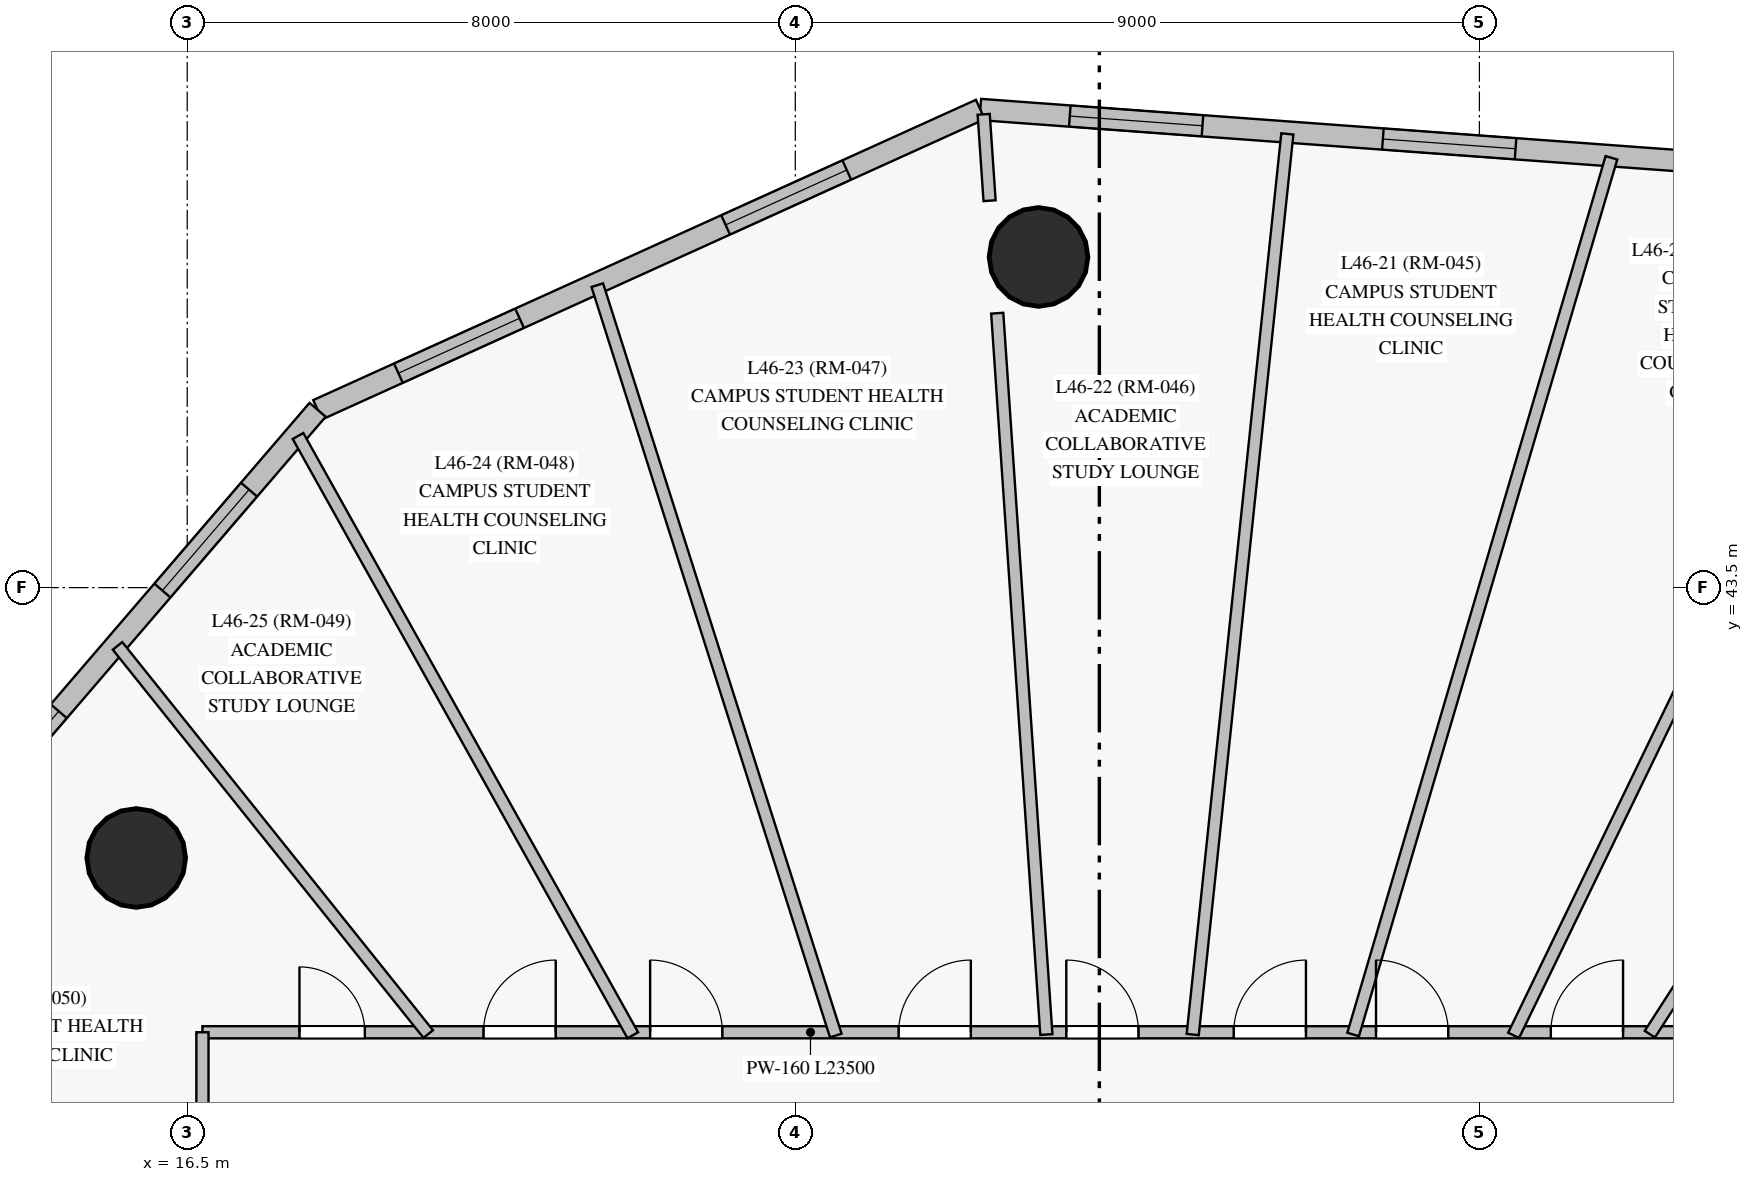
"""IFC4 building model, lengths in metres.
Left out: names, types, materials, properties, quantities, classifications, styles, units other than length and angle.
Written with IfcOpenShell. Run it as: python <this file> out.ifc"""

import sys

from ifc_helpers import new_model, si_unit, direction, frame, frame_2d, origin, origin_with_axes, origin_2d, place, context, subcontext, project, spatial, rectangle, circle, extrude, source, transform, mapped, element, fill, save


model = new_model("IFC4")
c1 = context("Model", 3, precision=1e-05, world=origin(), true_north=direction((0.0, 1.0)))
c2 = subcontext(c1, "Body", "Model", "MODEL_VIEW")
j1 = project(units=[si_unit("LENGTHUNIT", "METRE"), si_unit("PLANEANGLEUNIT", "RADIAN")], contexts=[c1])
p1 = place(None, origin())
s1 = spatial("IfcSite", under=j1, at=p1, CompositionType="ELEMENT")
p2 = place(p1, origin())
s2 = spatial("IfcBuilding", under=s1, at=p2, CompositionType="ELEMENT")
p3 = place(p2, frame((0.0, 0.0, 162.65)))
s3 = spatial("IfcBuildingStorey", under=s2, at=p3, CompositionType="ELEMENT", Elevation=162.65)
m1 = source(origin_with_axes(), c2, "Body", "SweptSolid", [
    extrude(circle(Radius=0.65, at=origin_2d()), origin(), (0.0, 0.0, 1.0), 3.05),
])
for number, where, z_axis, x_axis in (
    (1, (27.7, 47.85, 0.0), (0.0, 0.0, 1.0), (1.0, 0.0, 0.0)),
    (2, (15.829, 39.943, 0.0), (0.0, 0.0, 1.0), (1.0, 0.0, 0.0)),
):
    element("IfcColumn", number, at=place(p3, frame(where, z_axis=z_axis, x_axis=x_axis)), inside=s3, PredefinedType="COLUMN", context=c2, shape_type="MappedRepresentation", body=[
        mapped(m1, transform((0.0, 0.0, 0.0), scale=1.0)),
    ])
p4 = place(p3, frame((38.955, 48.908, 0.0), z_axis=(0.0, 0.0, 1.0), x_axis=(-0.997320223423, 0.07315990672, 0.0)))
e3 = element("IfcWall", 3, at=p4, inside=s3, PredefinedType="SOLIDWALL", context=c2, shape_type="SweptSolid", body=[
    extrude(rectangle(XDim=12.053, YDim=0.28, at=frame_2d((6.027, 0.0))), origin(), (0.0, 0.0, 1.0), 2.825),
])
p5 = place(p4, frame((1.022, 0.0, 0.85)))
e4 = element("IfcOpeningElement", 4, at=p5, cuts=e3, PredefinedType="OPENING", context=c2, shape_type="SweptSolid", body=[
    extrude(rectangle(XDim=1.75, YDim=1.65, at=frame_2d((0.875, 0.825))), frame((0.0, 0.15, 0.0), z_axis=(0.0, -1.0, 0.0), x_axis=(1.0, 0.0, 0.0)), (0.0, 0.0, 1.0), 0.3),
])
p6 = place(p4, frame((4.993, 0.0, 0.85)))
e5 = element("IfcOpeningElement", 5, at=p6, cuts=e3, PredefinedType="OPENING", context=c2, shape_type="SweptSolid", body=[
    extrude(rectangle(XDim=1.75, YDim=1.65, at=frame_2d((0.875, 0.825))), frame((0.0, 0.15, 0.0), z_axis=(0.0, -1.0, 0.0), x_axis=(1.0, 0.0, 0.0)), (0.0, 0.0, 1.0), 0.3),
])
p7 = place(p4, frame((9.123, 0.0, 0.85)))
e6 = element("IfcOpeningElement", 6, at=p7, cuts=e3, PredefinedType="OPENING", context=c2, shape_type="SweptSolid", body=[
    extrude(rectangle(XDim=1.75, YDim=1.65, at=frame_2d((0.875, 0.825))), frame((0.0, 0.15, 0.0), z_axis=(0.0, -1.0, 0.0), x_axis=(1.0, 0.0, 0.0)), (0.0, 0.0, 1.0), 0.3),
])
p8 = place(p3, frame((26.934, 49.79, 0.0), z_axis=(0.0, 0.0, 1.0), x_axis=(-0.910843657425, -0.412751537525, 0.0)))
e7 = element("IfcWall", 7, at=p8, inside=s3, PredefinedType="SOLIDWALL", context=c2, shape_type="SweptSolid", body=[
    extrude(rectangle(XDim=9.572, YDim=0.28, at=frame_2d((4.786, 0.0))), origin(), (0.0, 0.0, 1.0), 2.825),
])
p9 = place(p8, frame((1.929, 0.0, 0.85)))
e8 = element("IfcOpeningElement", 8, at=p9, cuts=e7, PredefinedType="OPENING", context=c2, shape_type="SweptSolid", body=[
    extrude(rectangle(XDim=1.75, YDim=1.65, at=frame_2d((0.875, 0.825))), frame((0.0, 0.15, 0.0), z_axis=(0.0, -1.0, 0.0), x_axis=(1.0, 0.0, 0.0)), (0.0, 0.0, 1.0), 0.3),
])
p10 = place(p8, frame((6.655, 0.0, 0.85)))
e9 = element("IfcOpeningElement", 9, at=p10, cuts=e7, PredefinedType="OPENING", context=c2, shape_type="SweptSolid", body=[
    extrude(rectangle(XDim=1.75, YDim=1.65, at=frame_2d((0.875, 0.825))), frame((0.0, 0.15, 0.0), z_axis=(0.0, -1.0, 0.0), x_axis=(1.0, 0.0, 0.0)), (0.0, 0.0, 1.0), 0.3),
])
p11 = place(p3, frame((18.215, 45.839, 0.0), z_axis=(0.0, 0.0, 1.0), x_axis=(-0.651462515178, -0.758680823085, 0.0)))
e10 = element("IfcWall", 10, at=p11, inside=s3, PredefinedType="SOLIDWALL", context=c2, shape_type="SweptSolid", body=[
    extrude(rectangle(XDim=13.656, YDim=0.28, at=frame_2d((6.828, 0.0))), origin(), (0.0, 0.0, 1.0), 2.825),
])
p12 = place(p11, frame((1.385, 0.0, 0.85)))
e11 = element("IfcOpeningElement", 11, at=p12, cuts=e10, PredefinedType="OPENING", context=c2, shape_type="SweptSolid", body=[
    extrude(rectangle(XDim=1.75, YDim=1.65, at=frame_2d((0.875, 0.825))), frame((0.0, 0.15, 0.0), z_axis=(0.0, -1.0, 0.0), x_axis=(1.0, 0.0, 0.0)), (0.0, 0.0, 1.0), 0.3),
])
p13 = place(p11, frame((5.227, 0.0, 0.85)))
e12 = element("IfcOpeningElement", 12, at=p13, cuts=e10, PredefinedType="OPENING", context=c2, shape_type="SweptSolid", body=[
    extrude(rectangle(XDim=1.75, YDim=1.65, at=frame_2d((0.875, 0.825))), frame((0.0, 0.15, 0.0), z_axis=(0.0, -1.0, 0.0), x_axis=(1.0, 0.0, 0.0)), (0.0, 0.0, 1.0), 0.3),
])
p14 = place(p11, frame((8.636, 0.0, 0.85)))
e13 = element("IfcOpeningElement", 13, at=p14, cuts=e10, PredefinedType="OPENING", context=c2, shape_type="SweptSolid", body=[
    extrude(rectangle(XDim=1.75, YDim=1.65, at=frame_2d((0.875, 0.825))), frame((0.0, 0.15, 0.0), z_axis=(0.0, -1.0, 0.0), x_axis=(1.0, 0.0, 0.0)), (0.0, 0.0, 1.0), 0.3),
])
p15 = place(p11, frame((12.091, 0.0, 0.85)))
e14 = element("IfcOpeningElement", 14, at=p15, cuts=e10, PredefinedType="OPENING", context=c2, shape_type="SweptSolid", body=[
    extrude(rectangle(XDim=0.95, YDim=1.5, at=frame_2d((0.475, 0.75))), frame((0.0, 0.15, 0.0), z_axis=(0.0, -1.0, 0.0), x_axis=(1.0, 0.0, 0.0)), (0.0, 0.0, 1.0), 0.3),
])
p16 = place(p3, frame((16.7, 37.65, 0.0), z_axis=(0.0, 0.0, 1.0), x_axis=(1.0, 0.0, 0.0)))
e15 = element("IfcWall", 15, at=p16, inside=s3, PredefinedType="PARTITIONING", context=c2, shape_type="SweptSolid", body=[
    extrude(rectangle(XDim=23.5, YDim=0.16, at=frame_2d((11.75, 0.0))), origin(), (0.0, 0.0, 1.0), 2.375),
])
p17 = place(p16, frame((20.87, 0.0, 0.0)))
e16 = element("IfcOpeningElement", 16, at=p17, cuts=e15, PredefinedType="OPENING", context=c2, shape_type="SweptSolid", body=[
    extrude(rectangle(XDim=0.95, YDim=2.15, at=frame_2d((0.475, 1.075))), frame((0.0, 0.09, 0.0), z_axis=(0.0, -1.0, 0.0), x_axis=(1.0, 0.0, 0.0)), (0.0, 0.0, 1.0), 0.18),
])
p18 = place(p16, frame((17.74, 0.0, 0.0)))
e17 = element("IfcOpeningElement", 17, at=p18, cuts=e15, PredefinedType="OPENING", context=c2, shape_type="SweptSolid", body=[
    extrude(rectangle(XDim=0.95, YDim=2.15, at=frame_2d((0.475, 1.075))), frame((0.0, 0.09, 0.0), z_axis=(0.0, -1.0, 0.0), x_axis=(1.0, 0.0, 0.0)), (0.0, 0.0, 1.0), 0.18),
])
p19 = place(p16, frame((15.44, 0.0, 0.0)))
e18 = element("IfcOpeningElement", 18, at=p19, cuts=e15, PredefinedType="OPENING", context=c2, shape_type="SweptSolid", body=[
    extrude(rectangle(XDim=0.95, YDim=2.15, at=frame_2d((0.475, 1.075))), frame((0.0, 0.09, 0.0), z_axis=(0.0, -1.0, 0.0), x_axis=(1.0, 0.0, 0.0)), (0.0, 0.0, 1.0), 0.18),
])
p20 = place(p16, frame((13.568, 0.0, 0.0)))
e19 = element("IfcOpeningElement", 19, at=p20, cuts=e15, PredefinedType="OPENING", context=c2, shape_type="SweptSolid", body=[
    extrude(rectangle(XDim=0.95, YDim=2.15, at=frame_2d((0.475, 1.075))), frame((0.0, 0.09, 0.0), z_axis=(0.0, -1.0, 0.0), x_axis=(1.0, 0.0, 0.0)), (0.0, 0.0, 1.0), 0.18),
])
p21 = place(p16, frame((11.365, 0.0, 0.0)))
e20 = element("IfcOpeningElement", 20, at=p21, cuts=e15, PredefinedType="OPENING", context=c2, shape_type="SweptSolid", body=[
    extrude(rectangle(XDim=0.95, YDim=2.15, at=frame_2d((0.475, 1.075))), frame((0.0, 0.09, 0.0), z_axis=(0.0, -1.0, 0.0), x_axis=(1.0, 0.0, 0.0)), (0.0, 0.0, 1.0), 0.18),
])
p22 = place(p16, frame((9.159, 0.0, 0.0)))
e21 = element("IfcOpeningElement", 21, at=p22, cuts=e15, PredefinedType="OPENING", context=c2, shape_type="SweptSolid", body=[
    extrude(rectangle(XDim=0.95, YDim=2.15, at=frame_2d((0.475, 1.075))), frame((0.0, 0.09, 0.0), z_axis=(0.0, -1.0, 0.0), x_axis=(1.0, 0.0, 0.0)), (0.0, 0.0, 1.0), 0.18),
])
p23 = place(p16, frame((5.89, 0.0, 0.0)))
e22 = element("IfcOpeningElement", 22, at=p23, cuts=e15, PredefinedType="OPENING", context=c2, shape_type="SweptSolid", body=[
    extrude(rectangle(XDim=0.95, YDim=2.15, at=frame_2d((0.475, 1.075))), frame((0.0, 0.09, 0.0), z_axis=(0.0, -1.0, 0.0), x_axis=(1.0, 0.0, 0.0)), (0.0, 0.0, 1.0), 0.18),
])
p24 = place(p16, frame((3.698, 0.0, 0.0)))
e23 = element("IfcOpeningElement", 23, at=p24, cuts=e15, PredefinedType="OPENING", context=c2, shape_type="SweptSolid", body=[
    extrude(rectangle(XDim=0.95, YDim=2.15, at=frame_2d((0.475, 1.075))), frame((0.0, 0.09, 0.0), z_axis=(0.0, -1.0, 0.0), x_axis=(1.0, 0.0, 0.0)), (0.0, 0.0, 1.0), 0.18),
])
p25 = place(p16, frame((1.277, 0.0, 0.0)))
e24 = element("IfcOpeningElement", 24, at=p25, cuts=e15, PredefinedType="OPENING", context=c2, shape_type="SweptSolid", body=[
    extrude(rectangle(XDim=0.86, YDim=2.04, at=frame_2d((0.43, 1.02))), frame((0.0, 0.09, 0.0), z_axis=(0.0, -1.0, 0.0), x_axis=(1.0, 0.0, 0.0)), (0.0, 0.0, 1.0), 0.18),
])
p26 = place(p3, frame((16.7, 15.35, 0.0), z_axis=(0.0, 0.0, 1.0), x_axis=(0.0, 1.0, 0.0)))
e25 = element("IfcWall", 25, at=p26, inside=s3, PredefinedType="PARTITIONING", context=c2, shape_type="SweptSolid", body=[
    extrude(rectangle(XDim=22.3, YDim=0.16, at=frame_2d((11.15, 0.0))), origin(), (0.0, 0.0, 1.0), 2.275),
])
p27 = place(p26, frame((11.715, 0.0, 0.0)))
e26 = element("IfcOpeningElement", 26, at=p27, cuts=e25, PredefinedType="OPENING", context=c2, shape_type="SweptSolid", body=[
    extrude(rectangle(XDim=0.95, YDim=2.15, at=frame_2d((0.475, 1.075))), frame((0.0, 0.09, 0.0), z_axis=(0.0, -1.0, 0.0), x_axis=(1.0, 0.0, 0.0)), (0.0, 0.0, 1.0), 0.18),
])
p28 = place(p26, frame((7.33, 0.0, 0.0)))
e27 = element("IfcOpeningElement", 27, at=p28, cuts=e25, PredefinedType="OPENING", context=c2, shape_type="SweptSolid", body=[
    extrude(rectangle(XDim=0.96, YDim=2.15, at=frame_2d((0.48, 1.075))), frame((0.0, 0.09, 0.0), z_axis=(0.0, -1.0, 0.0), x_axis=(1.0, 0.0, 0.0)), (0.0, 0.0, 1.0), 0.18),
])
p29 = place(p26, frame((4.61, 0.0, 0.0)))
e28 = element("IfcOpeningElement", 28, at=p29, cuts=e25, PredefinedType="OPENING", context=c2, shape_type="SweptSolid", body=[
    extrude(rectangle(XDim=0.95, YDim=2.15, at=frame_2d((0.475, 1.075))), frame((0.0, 0.09, 0.0), z_axis=(0.0, -1.0, 0.0), x_axis=(1.0, 0.0, 0.0)), (0.0, 0.0, 1.0), 0.18),
])
p30 = place(p26, frame((16.99, 0.0, 0.0)))
e29 = element("IfcOpeningElement", 29, at=p30, cuts=e25, PredefinedType="OPENING", context=c2, shape_type="SweptSolid", body=[
    extrude(rectangle(XDim=0.95, YDim=2.15, at=frame_2d((0.475, 1.075))), frame((0.0, 0.09, 0.0), z_axis=(0.0, -1.0, 0.0), x_axis=(1.0, 0.0, 0.0)), (0.0, 0.0, 1.0), 0.18),
])
p31 = place(p26, frame((14.56, 0.0, 0.0)))
e30 = element("IfcOpeningElement", 30, at=p31, cuts=e25, PredefinedType="OPENING", context=c2, shape_type="SweptSolid", body=[
    extrude(rectangle(XDim=0.95, YDim=2.15, at=frame_2d((0.475, 1.075))), frame((0.0, 0.09, 0.0), z_axis=(0.0, -1.0, 0.0), x_axis=(1.0, 0.0, 0.0)), (0.0, 0.0, 1.0), 0.18),
])
p32 = place(p26, frame((13.43, 0.0, 0.0)))
e31 = element("IfcOpeningElement", 31, at=p32, cuts=e25, PredefinedType="OPENING", context=c2, shape_type="SweptSolid", body=[
    extrude(rectangle(XDim=0.95, YDim=2.15, at=frame_2d((0.475, 1.075))), frame((0.0, 0.09, 0.0), z_axis=(0.0, -1.0, 0.0), x_axis=(1.0, 0.0, 0.0)), (0.0, 0.0, 1.0), 0.18),
])
p33 = place(p3, frame((33.95, 37.61, 0.0), z_axis=(0.0, 0.0, 1.0), x_axis=(0.436077675218, 0.899909029389, 0.0)))
e32 = element("IfcWall", 32, at=p33, inside=s3, PredefinedType="PARTITIONING", context=c2, shape_type="SweptSolid", body=[
    extrude(rectangle(XDim=12.175, YDim=0.16, at=frame_2d((6.087, 0.0))), origin(), (0.0, 0.0, 1.0), 2.825),
])
p34 = place(p3, frame((31.839, 37.621, 0.0), z_axis=(0.0, 0.0, 1.0), x_axis=(0.282612627523, 0.959234123019, 0.0)))
e33 = element("IfcWall", 33, at=p34, inside=s3, PredefinedType="PARTITIONING", context=c2, shape_type="SweptSolid", body=[
    extrude(rectangle(XDim=12.023, YDim=0.16, at=frame_2d((6.012, 0.0))), origin(), (0.0, 0.0, 1.0), 2.825),
])
p35 = place(p3, frame((29.729, 37.62, 0.0), z_axis=(0.0, 0.0, 1.0), x_axis=(0.104491703071, 0.994525758334, 0.0)))
e34 = element("IfcWall", 34, at=p35, inside=s3, PredefinedType="PARTITIONING", context=c2, shape_type="SweptSolid", body=[
    extrude(rectangle(XDim=11.914, YDim=0.16, at=frame_2d((5.957, 0.0))), origin(), (0.0, 0.0, 1.0), 2.825),
])
p36 = place(p3, frame((35.742, 37.625, 0.0), z_axis=(0.0, 0.0, 1.0), x_axis=(0.541788474869, 0.840514871076, 0.0)))
e35 = element("IfcWall", 35, at=p36, inside=s3, PredefinedType="PARTITIONING", context=c2, shape_type="SweptSolid", body=[
    extrude(rectangle(XDim=10.469, YDim=0.16, at=frame_2d((5.235, 0.0))), origin(), (0.0, 0.0, 1.0), 2.825),
])
p37 = place(p3, frame((25.033, 37.607, 0.0), z_axis=(0.0, 0.0, 1.0), x_axis=(-0.302917623472, 0.953016743499, 0.0)))
e36 = element("IfcWall", 36, at=p37, inside=s3, PredefinedType="PARTITIONING", context=c2, shape_type="SweptSolid", body=[
    extrude(rectangle(XDim=10.358, YDim=0.16, at=frame_2d((5.179, 0.0))), origin(), (0.0, 0.0, 1.0), 2.825),
])
p38 = place(p3, frame((27.803, 37.62, 0.0), z_axis=(0.0, 0.0, 1.0), x_axis=(-0.067965244052, 0.99768768941, 0.0)))
e37 = element("IfcWall", 37, at=p38, inside=s3, PredefinedType="PARTITIONING", context=c2, shape_type="SweptSolid", body=[
    extrude(rectangle(XDim=9.512, YDim=0.16, at=frame_2d((4.756, 0.0))), origin(), (0.0, 0.0, 1.0), 2.275),
])
p39 = place(p3, frame((22.362, 37.611, 0.0), z_axis=(0.0, 0.0, 1.0), x_axis=(-0.487695929891, 0.873013562305, 0.0)))
e38 = element("IfcWall", 38, at=p39, inside=s3, PredefinedType="PARTITIONING", context=c2, shape_type="SweptSolid", body=[
    extrude(rectangle(XDim=9.031, YDim=0.16, at=frame_2d((4.515, 0.0))), origin(), (0.0, 0.0, 1.0), 2.825),
])
p40 = place(p3, frame((19.671, 37.627, 0.0), z_axis=(0.0, 0.0, 1.0), x_axis=(-0.624931699551, 0.78067942902, 0.0)))
e39 = element("IfcWall", 39, at=p40, inside=s3, PredefinedType="PARTITIONING", context=c2, shape_type="SweptSolid", body=[
    extrude(rectangle(XDim=6.541, YDim=0.16, at=frame_2d((3.271, 0.0))), origin(), (0.0, 0.0, 1.0), 2.825),
])
p41 = place(p3, frame((27.056, 48.59, 0.0), z_axis=(0.0, 0.0, 1.0), x_axis=(-0.067955994258, 0.997688319489, 0.0)))
e40 = element("IfcWall", 40, at=p41, inside=s3, PredefinedType="PARTITIONING", context=c2, shape_type="SweptSolid", body=[
    extrude(rectangle(XDim=1.139, YDim=0.16, at=frame_2d((0.569, 0.0))), origin(), (0.0, 0.0, 1.0), 2.825),
])
m2 = source(origin_with_axes(), c2, "Body", "SweptSolid", [
    extrude(rectangle(XDim=1.75, YDim=1.65, at=frame_2d((0.875, 0.825))), frame((0.0, 0.03, 0.0), z_axis=(0.0, -1.0, 0.0), x_axis=(1.0, 0.0, 0.0)), (0.0, 0.0, 1.0), 0.06),
])
p42 = place(p6, origin())
e41 = element("IfcWindow", 41, at=p42, inside=s3, PartitioningType="SINGLE_PANEL", PredefinedType="WINDOW", context=c2, shape_type="MappedRepresentation", body=[
    mapped(m2, transform((0.0, 0.0, 0.0), scale=1.0)),
])
fill(e5, e41)
p43 = place(p7, origin())
e42 = element("IfcWindow", 42, at=p43, inside=s3, PartitioningType="SINGLE_PANEL", PredefinedType="WINDOW", context=c2, shape_type="MappedRepresentation", body=[
    mapped(m2, transform((0.0, 0.0, 0.0), scale=1.0)),
])
fill(e6, e42)
p44 = place(p9, origin())
e43 = element("IfcWindow", 43, at=p44, inside=s3, PartitioningType="SINGLE_PANEL", PredefinedType="WINDOW", context=c2, shape_type="MappedRepresentation", body=[
    mapped(m2, transform((0.0, 0.0, 0.0), scale=1.0)),
])
fill(e8, e43)
p45 = place(p10, origin())
e44 = element("IfcWindow", 44, at=p45, inside=s3, PartitioningType="SINGLE_PANEL", PredefinedType="WINDOW", context=c2, shape_type="MappedRepresentation", body=[
    mapped(m2, transform((0.0, 0.0, 0.0), scale=1.0)),
])
fill(e9, e44)
p46 = place(p12, origin())
e45 = element("IfcWindow", 45, at=p46, inside=s3, PartitioningType="SINGLE_PANEL", PredefinedType="WINDOW", context=c2, shape_type="MappedRepresentation", body=[
    mapped(m2, transform((0.0, 0.0, 0.0), scale=1.0)),
])
fill(e11, e45)
p47 = place(p13, origin())
e46 = element("IfcWindow", 46, at=p47, inside=s3, PartitioningType="SINGLE_PANEL", PredefinedType="WINDOW", context=c2, shape_type="MappedRepresentation", body=[
    mapped(m2, transform((0.0, 0.0, 0.0), scale=1.0)),
])
fill(e12, e46)
m3 = source(origin_with_axes(), c2, "Body", "SweptSolid", [
    extrude(rectangle(XDim=0.95, YDim=2.15, at=frame_2d((0.475, 1.075))), frame((0.0, 0.025, 0.0), z_axis=(0.0, -1.0, 0.0), x_axis=(1.0, 0.0, 0.0)), (0.0, 0.0, 1.0), 0.05),
])
p48 = place(p18, origin())
e47 = element("IfcDoor", 47, at=p48, inside=s3, OperationType="SINGLE_SWING_RIGHT", PredefinedType="DOOR", context=c2, shape_type="MappedRepresentation", body=[
    mapped(m3, transform((0.0, 0.0, 0.0), scale=1.0)),
])
fill(e17, e47)
p49 = place(p19, origin())
e48 = element("IfcDoor", 48, at=p49, inside=s3, OperationType="SINGLE_SWING_LEFT", PredefinedType="DOOR", context=c2, shape_type="MappedRepresentation", body=[
    mapped(m3, transform((0.0, 0.0, 0.0), scale=1.0)),
])
fill(e18, e48)
p50 = place(p20, origin())
e49 = element("IfcDoor", 49, at=p50, inside=s3, OperationType="SINGLE_SWING_RIGHT", PredefinedType="DOOR", context=c2, shape_type="MappedRepresentation", body=[
    mapped(m3, transform((0.0, 0.0, 0.0), scale=1.0)),
])
fill(e19, e49)
p51 = place(p21, origin())
e50 = element("IfcDoor", 50, at=p51, inside=s3, OperationType="SINGLE_SWING_LEFT", PredefinedType="DOOR", context=c2, shape_type="MappedRepresentation", body=[
    mapped(m3, transform((0.0, 0.0, 0.0), scale=1.0)),
])
fill(e20, e50)
p52 = place(p22, origin())
e51 = element("IfcDoor", 51, at=p52, inside=s3, OperationType="SINGLE_SWING_RIGHT", PredefinedType="DOOR", context=c2, shape_type="MappedRepresentation", body=[
    mapped(m3, transform((0.0, 0.0, 0.0), scale=1.0)),
])
fill(e21, e51)
p53 = place(p23, origin())
e52 = element("IfcDoor", 52, at=p53, inside=s3, OperationType="SINGLE_SWING_LEFT", PredefinedType="DOOR", context=c2, shape_type="MappedRepresentation", body=[
    mapped(m3, transform((0.0, 0.0, 0.0), scale=1.0)),
])
fill(e22, e52)
p54 = place(p24, origin())
e53 = element("IfcDoor", 53, at=p54, inside=s3, OperationType="SINGLE_SWING_RIGHT", PredefinedType="DOOR", context=c2, shape_type="MappedRepresentation", body=[
    mapped(m3, transform((0.0, 0.0, 0.0), scale=1.0)),
])
fill(e23, e53)
m4 = source(origin_with_axes(), c2, "Body", "SweptSolid", [
    extrude(rectangle(XDim=0.86, YDim=2.04, at=frame_2d((0.43, 1.02))), frame((0.0, 0.025, 0.0), z_axis=(0.0, -1.0, 0.0), x_axis=(1.0, 0.0, 0.0)), (0.0, 0.0, 1.0), 0.05),
])
p55 = place(p25, origin())
e54 = element("IfcDoor", 54, at=p55, inside=s3, OperationType="SINGLE_SWING_LEFT", PredefinedType="DOOR", context=c2, shape_type="MappedRepresentation", body=[
    mapped(m4, transform((0.0, 0.0, 0.0), scale=1.0)),
])
fill(e24, e54)
save(model, sys.argv[1])
